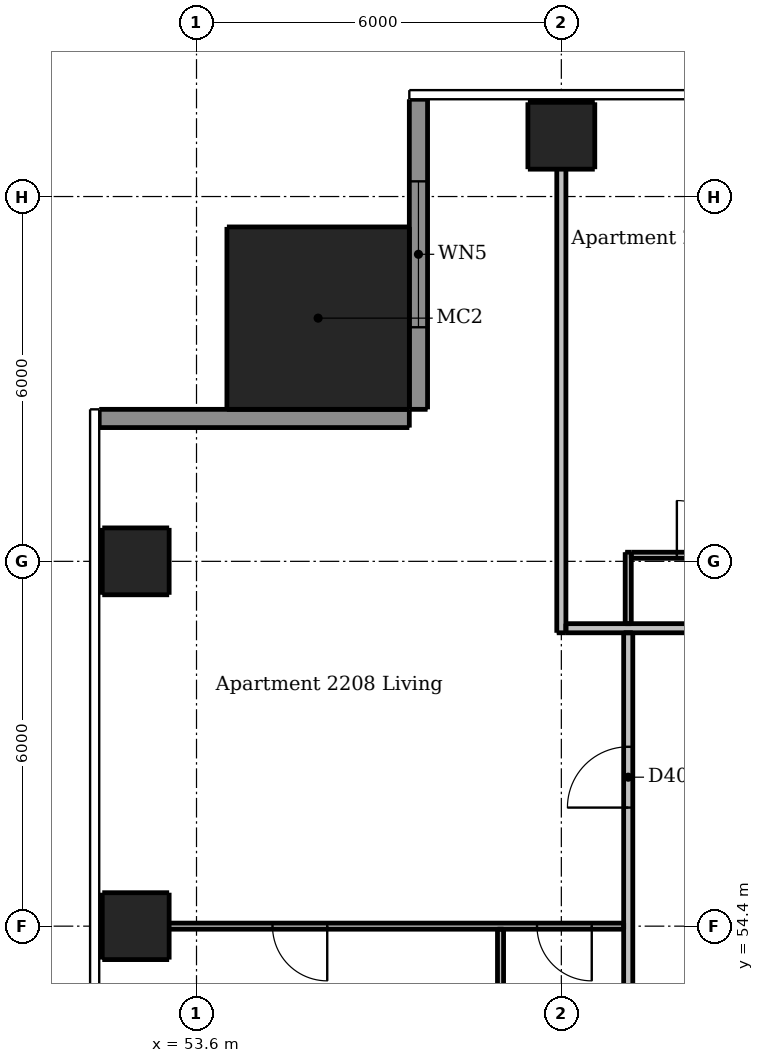
"""IFC4 building model, lengths in metres.
Left out: names, types, materials, properties, quantities, classifications, styles, units other than length and angle.
Written with IfcOpenShell. Run it as: python <this file> out.ifc"""

import sys

from ifc_helpers import new_model, si_unit, direction, frame, frame_2d, origin, origin_2d, place, context, subcontext, project, spatial, rectangle, extrude, element, fill, save


model = new_model("IFC4")
c1 = context("Model", 3, precision=1e-05, world=origin(), true_north=direction((0.0, 1.0)))
c2 = subcontext(c1, "Body", "Model", "MODEL_VIEW")
j1 = project(units=[si_unit("LENGTHUNIT", "METRE"), si_unit("PLANEANGLEUNIT", "RADIAN")], contexts=[c1])
p1 = place(None, origin())
s1 = spatial("IfcSite", under=j1, at=p1, CompositionType="ELEMENT")
p2 = place(p1, origin())
s2 = spatial("IfcBuilding", under=s1, at=p2, CompositionType="ELEMENT")
p3 = place(p2, frame((0.0, 0.0, 85.3)))
s3 = spatial("IfcBuildingStorey", under=s2, at=p3, CompositionType="ELEMENT", Elevation=85.3)
for number, where, z_axis, x_axis in (
    (1, (59.6, 67.4, 0.0), (0.0, 0.0, 1.0), (1.0, 0.0, 0.0)),
    (2, (52.6, 54.4, 0.0), (0.0, 0.0, 1.0), (1.0, 0.0, 0.0)),
    (3, (52.6, 60.4, 0.0), (0.0, 0.0, 1.0), (1.0, 0.0, 0.0)),
):
    element("IfcColumn", number, at=place(p3, frame(where, z_axis=z_axis, x_axis=x_axis)), inside=s3, PredefinedType="COLUMN", context=c2, shape_type="SweptSolid", body=[
        extrude(rectangle(XDim=1.1, YDim=1.1, at=origin_2d()), origin(), (0.0, 0.0, 1.0), 3.05),
    ])
p4 = place(p3, frame((55.6, 64.4, 0.0), z_axis=(0.0, 0.0, 1.0), x_axis=(1.0, 0.0, 0.0)))
e4 = element("IfcColumn", 4, at=p4, inside=s3, PredefinedType="COLUMN", context=c2, shape_type="SweptSolid", body=[
    extrude(rectangle(XDim=3.0, YDim=3.0, at=origin_2d()), origin(), (0.0, 0.0, 1.0), 3.3),
])
p5 = place(p3, frame((57.25, 68.0, 0.0), z_axis=(0.0, 0.0, 1.0), x_axis=(0.0, -1.0, 0.0)))
e5 = element("IfcWall", 5, at=p5, inside=s3, PredefinedType="SOLIDWALL", context=c2, shape_type="SweptSolid", body=[
    extrude(rectangle(XDim=5.1, YDim=0.3, at=frame_2d((2.55, 0.0))), origin(), (0.0, 0.0, 1.0), 3.05),
])
p6 = place(p5, frame((1.35, 0.0, 0.15)))
e6 = element("IfcOpeningElement", 6, at=p6, cuts=e5, PredefinedType="OPENING", context=c2, shape_type="SweptSolid", body=[
    extrude(rectangle(XDim=2.4, YDim=2.1, at=frame_2d((1.2, 1.05))), frame((0.0, 0.16, 0.0), z_axis=(0.0, -1.0, 0.0), x_axis=(1.0, 0.0, 0.0)), (0.0, 0.0, 1.0), 0.32),
])
p7 = place(p3, frame((57.1, 62.75, 0.0), z_axis=(0.0, 0.0, 1.0), x_axis=(-1.0, 0.0, 0.0)))
e7 = element("IfcWall", 7, at=p7, inside=s3, PredefinedType="SOLIDWALL", context=c2, shape_type="SweptSolid", body=[
    extrude(rectangle(XDim=5.1, YDim=0.3, at=frame_2d((2.55, 0.0))), origin(), (0.0, 0.0, 1.0), 3.05),
])
p8 = place(p3, frame((58.6, 54.35, 0.0), z_axis=(0.0, 0.0, 1.0), x_axis=(0.0, -1.0, 0.0)))
e8 = element("IfcWall", 8, at=p8, inside=s3, PredefinedType="PARTITIONING", context=c2, shape_type="SweptSolid", body=[
    extrude(rectangle(XDim=5.875, YDim=0.1, at=frame_2d((2.938, 0.0))), origin(), (0.0, 0.0, 1.0), 3.05),
])
p9 = place(p8, frame((3.75, 0.0, 0.0)))
e9 = element("IfcOpeningElement", 9, at=p9, cuts=e8, PredefinedType="OPENING", context=c2, shape_type="SweptSolid", body=[
    extrude(rectangle(XDim=0.8, YDim=2.1, at=frame_2d((0.4, 1.05))), frame((0.0, 0.06, 0.0), z_axis=(0.0, -1.0, 0.0), x_axis=(1.0, 0.0, 0.0)), (0.0, 0.0, 1.0), 0.12),
])
p10 = place(p3, frame((60.7, 59.375, 0.0), z_axis=(0.0, 0.0, 1.0), x_axis=(0.0, 1.0, 0.0)))
e10 = element("IfcWall", 10, at=p10, inside=s3, PredefinedType="PARTITIONING", context=c2, shape_type="SweptSolid", body=[
    extrude(rectangle(XDim=1.175, YDim=0.1, at=frame_2d((0.587, 0.0))), origin(), (0.0, 0.0, 1.0), 3.05),
])
p11 = place(p3, frame((60.75, 60.5, 0.0), z_axis=(0.0, 0.0, 1.0), x_axis=(1.0, 0.0, 0.0)))
e11 = element("IfcWall", 11, at=p11, inside=s3, PredefinedType="PARTITIONING", context=c2, shape_type="SweptSolid", body=[
    extrude(rectangle(XDim=16.775, YDim=0.1, at=frame_2d((8.387, 0.0))), origin(), (0.0, 0.0, 1.0), 3.05),
])
p12 = place(p11, frame((8.9, 0.0, 0.0)))
e12 = element("IfcOpeningElement", 12, at=p12, cuts=e11, PredefinedType="OPENING", context=c2, shape_type="SweptSolid", body=[
    extrude(rectangle(XDim=0.9, YDim=2.1, at=frame_2d((0.45, 1.05))), frame((0.0, 0.06, 0.0), z_axis=(0.0, -1.0, 0.0), x_axis=(1.0, 0.0, 0.0)), (0.0, 0.0, 1.0), 0.12),
])
p13 = place(p11, frame((14.9, 0.0, 0.0)))
e13 = element("IfcOpeningElement", 13, at=p13, cuts=e11, PredefinedType="OPENING", context=c2, shape_type="SweptSolid", body=[
    extrude(rectangle(XDim=0.9, YDim=2.1, at=frame_2d((0.45, 1.05))), frame((0.0, 0.06, 0.0), z_axis=(0.0, -1.0, 0.0), x_axis=(1.0, 0.0, 0.0)), (0.0, 0.0, 1.0), 0.12),
])
p14 = place(p11, frame((12.5, 0.0, 0.0)))
e14 = element("IfcOpeningElement", 14, at=p14, cuts=e11, PredefinedType="OPENING", context=c2, shape_type="SweptSolid", body=[
    extrude(rectangle(XDim=0.9, YDim=2.1, at=frame_2d((0.45, 1.05))), frame((0.0, 0.06, 0.0), z_axis=(0.0, -1.0, 0.0), x_axis=(1.0, 0.0, 0.0)), (0.0, 0.0, 1.0), 0.12),
])
p15 = place(p11, frame((5.35, 0.0, 0.0)))
e15 = element("IfcOpeningElement", 15, at=p15, cuts=e11, PredefinedType="OPENING", context=c2, shape_type="SweptSolid", body=[
    extrude(rectangle(XDim=0.8, YDim=2.1, at=frame_2d((0.4, 1.05))), frame((0.0, 0.06, 0.0), z_axis=(0.0, -1.0, 0.0), x_axis=(1.0, 0.0, 0.0)), (0.0, 0.0, 1.0), 0.12),
])
p16 = place(p11, frame((0.75, 0.0, 0.0)))
e16 = element("IfcOpeningElement", 16, at=p16, cuts=e11, PredefinedType="OPENING", context=c2, shape_type="SweptSolid", body=[
    extrude(rectangle(XDim=0.9, YDim=2.1, at=frame_2d((0.45, 1.05))), frame((0.0, 0.06, 0.0), z_axis=(0.0, -1.0, 0.0), x_axis=(1.0, 0.0, 0.0)), (0.0, 0.0, 1.0), 0.12),
])
p17 = place(p11, frame((3.25, 0.0, 0.0)))
e17 = element("IfcOpeningElement", 17, at=p17, cuts=e11, PredefinedType="OPENING", context=c2, shape_type="SweptSolid", body=[
    extrude(rectangle(XDim=0.8, YDim=2.1, at=frame_2d((0.4, 1.05))), frame((0.0, 0.06, 0.0), z_axis=(0.0, -1.0, 0.0), x_axis=(1.0, 0.0, 0.0)), (0.0, 0.0, 1.0), 0.12),
])
p18 = place(p3, frame((60.625, 54.4, 0.0), z_axis=(0.0, 0.0, 1.0), x_axis=(-1.0, 0.0, 0.0)))
e18 = element("IfcWall", 18, at=p18, inside=s3, PredefinedType="PARTITIONING", context=c2, shape_type="SweptSolid", body=[
    extrude(rectangle(XDim=8.625, YDim=0.1, at=frame_2d((4.312, 0.0))), origin(), (0.0, 0.0, 1.0), 2.516),
])
p19 = place(p18, frame((0.525, 0.0, 0.0)))
e19 = element("IfcOpeningElement", 19, at=p19, cuts=e18, PredefinedType="OPENING", context=c2, shape_type="SweptSolid", body=[
    extrude(rectangle(XDim=0.9, YDim=2.1, at=frame_2d((0.45, 1.05))), frame((0.0, 0.06, 0.0), z_axis=(0.0, -1.0, 0.0), x_axis=(1.0, 0.0, 0.0)), (0.0, 0.0, 1.0), 0.12),
])
p20 = place(p18, frame((4.875, 0.0, 0.0)))
e20 = element("IfcOpeningElement", 20, at=p20, cuts=e18, PredefinedType="OPENING", context=c2, shape_type="SweptSolid", body=[
    extrude(rectangle(XDim=0.9, YDim=2.1, at=frame_2d((0.45, 1.05))), frame((0.0, 0.06, 0.0), z_axis=(0.0, -1.0, 0.0), x_axis=(1.0, 0.0, 0.0)), (0.0, 0.0, 1.0), 0.12),
])
p21 = place(p3, frame((59.6, 59.225, 0.0), z_axis=(0.0, 0.0, 1.0), x_axis=(0.0, 1.0, 0.0)))
e21 = element("IfcWall", 21, at=p21, inside=s3, PredefinedType="PARTITIONING", context=c2, shape_type="SweptSolid", body=[
    extrude(rectangle(XDim=8.775, YDim=0.15, at=frame_2d((4.387, 0.0))), origin(), (0.0, 0.0, 1.0), 2.51),
])
p22 = place(p3, frame((60.7, 30.325, 0.0), z_axis=(0.0, 0.0, 1.0), x_axis=(0.0, 1.0, 0.0)))
e22 = element("IfcWall", 22, at=p22, inside=s3, PredefinedType="PARTITIONING", context=c2, shape_type="SweptSolid", body=[
    extrude(rectangle(XDim=28.9, YDim=0.15, at=frame_2d((14.45, 0.0))), origin(), (0.0, 0.0, 1.0), 3.05),
])
p23 = place(p22, frame((9.225, 0.0, 0.0)))
e23 = element("IfcOpeningElement", 23, at=p23, cuts=e22, PredefinedType="OPENING", context=c2, shape_type="SweptSolid", body=[
    extrude(rectangle(XDim=1.0, YDim=2.1, at=frame_2d((0.5, 1.05))), frame((0.0, 0.085, 0.0), z_axis=(0.0, -1.0, 0.0), x_axis=(1.0, 0.0, 0.0)), (0.0, 0.0, 1.0), 0.17),
])
p24 = place(p22, frame((26.025, 0.0, 0.0)))
e24 = element("IfcOpeningElement", 24, at=p24, cuts=e22, PredefinedType="OPENING", context=c2, shape_type="SweptSolid", body=[
    extrude(rectangle(XDim=1.0, YDim=2.1, at=frame_2d((0.5, 1.05))), frame((0.0, 0.085, 0.0), z_axis=(0.0, -1.0, 0.0), x_axis=(1.0, 0.0, 0.0)), (0.0, 0.0, 1.0), 0.17),
])
p25 = place(p3, frame((59.675, 59.3, 0.0), z_axis=(0.0, 0.0, 1.0), x_axis=(1.0, 0.0, 0.0)))
e25 = element("IfcWall", 25, at=p25, inside=s3, PredefinedType="PARTITIONING", context=c2, shape_type="SweptSolid", body=[
    extrude(rectangle(XDim=28.55, YDim=0.15, at=frame_2d((14.275, 0.0))), origin(), (0.0, 0.0, 1.0), 3.05),
])
p26 = place(p25, frame((8.975, 0.0, 0.0)))
e26 = element("IfcOpeningElement", 26, at=p26, cuts=e25, PredefinedType="OPENING", context=c2, shape_type="SweptSolid", body=[
    extrude(rectangle(XDim=1.0, YDim=2.1, at=frame_2d((0.5, 1.05))), frame((0.0, 0.085, 0.0), z_axis=(0.0, -1.0, 0.0), x_axis=(1.0, 0.0, 0.0)), (0.0, 0.0, 1.0), 0.17),
])
p27 = place(p25, frame((25.775, 0.0, 0.0)))
e27 = element("IfcOpeningElement", 27, at=p27, cuts=e25, PredefinedType="OPENING", context=c2, shape_type="SweptSolid", body=[
    extrude(rectangle(XDim=1.0, YDim=2.1, at=frame_2d((0.5, 1.05))), frame((0.0, 0.085, 0.0), z_axis=(0.0, -1.0, 0.0), x_axis=(1.0, 0.0, 0.0)), (0.0, 0.0, 1.0), 0.17),
])
p28 = place(p6, origin())
e28 = element("IfcWindow", 28, at=p28, inside=s3, PartitioningType="DOUBLE_PANEL_VERTICAL", PredefinedType="WINDOW", context=c2, shape_type="SweptSolid", body=[
    extrude(rectangle(XDim=2.4, YDim=2.1, at=frame_2d((1.2, 1.05))), frame((0.0, 0.03, 0.0), z_axis=(0.0, -1.0, 0.0), x_axis=(1.0, 0.0, 0.0)), (0.0, 0.0, 1.0), 0.06),
])
fill(e6, e28)
p29 = place(p16, origin())
e29 = element("IfcDoor", 29, at=p29, inside=s3, OperationType="SINGLE_SWING_LEFT", PredefinedType="DOOR", context=c2, shape_type="SweptSolid", body=[
    extrude(rectangle(XDim=0.9, YDim=2.1, at=frame_2d((0.45, 1.05))), frame((0.0, 0.025, 0.0), z_axis=(0.0, -1.0, 0.0), x_axis=(1.0, 0.0, 0.0)), (0.0, 0.0, 1.0), 0.05),
])
fill(e16, e29)
p30 = place(p24, origin())
e30 = element("IfcDoor", 30, at=p30, inside=s3, OperationType="SINGLE_SWING_LEFT", PredefinedType="DOOR", context=c2, shape_type="SweptSolid", body=[
    extrude(rectangle(XDim=1.0, YDim=2.1, at=frame_2d((0.5, 1.05))), frame((0.0, 0.025, 0.0), z_axis=(0.0, -1.0, 0.0), x_axis=(1.0, 0.0, 0.0)), (0.0, 0.0, 1.0), 0.05),
])
fill(e24, e30)
p31 = place(p19, origin())
e31 = element("IfcDoor", 31, at=p31, inside=s3, OperationType="SINGLE_SWING_LEFT", PredefinedType="DOOR", context=c2, shape_type="SweptSolid", body=[
    extrude(rectangle(XDim=0.9, YDim=2.1, at=frame_2d((0.45, 1.05))), frame((0.0, 0.025, 0.0), z_axis=(0.0, -1.0, 0.0), x_axis=(1.0, 0.0, 0.0)), (0.0, 0.0, 1.0), 0.05),
])
fill(e19, e31)
p32 = place(p20, origin())
e32 = element("IfcDoor", 32, at=p32, inside=s3, OperationType="SINGLE_SWING_LEFT", PredefinedType="DOOR", context=c2, shape_type="SweptSolid", body=[
    extrude(rectangle(XDim=0.9, YDim=2.1, at=frame_2d((0.45, 1.05))), frame((0.0, 0.025, 0.0), z_axis=(0.0, -1.0, 0.0), x_axis=(1.0, 0.0, 0.0)), (0.0, 0.0, 1.0), 0.05),
])
fill(e20, e32)
save(model, sys.argv[1])
